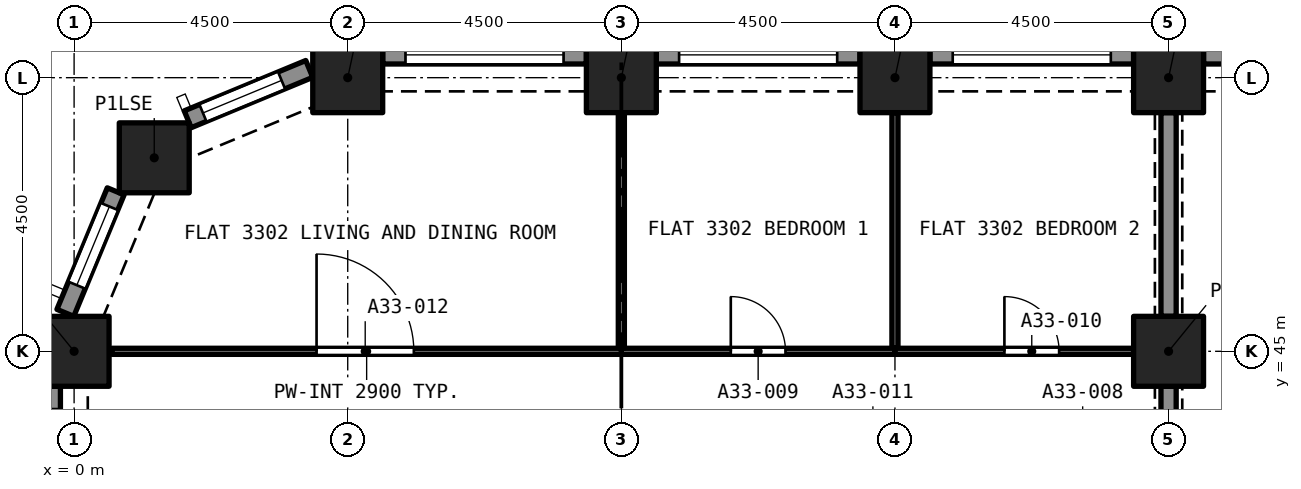
"""IFC4 building model, lengths in metres.
Left out: names, types, materials, properties, quantities, classifications, styles, units other than length and angle.
Written with IfcOpenShell. Run it as: python <this file> out.ifc"""

import sys

from ifc_helpers import new_model, si_unit, direction, frame, frame_2d, origin, origin_2d, place, context, subcontext, project, spatial, rectangle, extrude, element, fill, save


model = new_model("IFC4")
c1 = context("Model", 3, precision=1e-05, world=origin(), true_north=direction((0.0, 1.0)))
c2 = subcontext(c1, "Body", "Model", "MODEL_VIEW")
j1 = project(units=[si_unit("LENGTHUNIT", "METRE"), si_unit("PLANEANGLEUNIT", "RADIAN")], contexts=[c1])
p1 = place(None, origin())
s1 = spatial("IfcSite", under=j1, at=p1, CompositionType="ELEMENT")
p2 = place(p1, origin())
s2 = spatial("IfcBuilding", under=s1, at=p2, CompositionType="ELEMENT")
p3 = place(p2, frame((0.0, 0.0, 118.4)))
s3 = spatial("IfcBuildingStorey", under=s2, at=p3, CompositionType="ELEMENT", Elevation=118.4)
for number, where, z_axis, x_axis in (
    (1, (0.0, 45.0, 0.0), (0.0, 0.0, 1.0), (1.0, 0.0, 0.0)),
    (2, (18.0, 45.0, 0.0), (0.0, 0.0, 1.0), (1.0, 0.0, 0.0)),
    (3, (1.318, 48.182, 0.0), (0.0, 0.0, 1.0), (1.0, 0.0, 0.0)),
    (4, (4.5, 49.5, 0.0), (0.0, 0.0, 1.0), (1.0, 0.0, 0.0)),
    (5, (9.0, 49.5, 0.0), (0.0, 0.0, 1.0), (1.0, 0.0, 0.0)),
    (6, (13.5, 49.5, 0.0), (0.0, 0.0, 1.0), (1.0, 0.0, 0.0)),
    (7, (18.0, 49.5, 0.0), (0.0, 0.0, 1.0), (1.0, 0.0, 0.0)),
):
    element("IfcColumn", number, at=place(p3, frame(where, z_axis=z_axis, x_axis=x_axis)), inside=s3, PredefinedType="COLUMN", context=c2, shape_type="SweptSolid", body=[
        extrude(rectangle(XDim=1.15, YDim=1.15, at=origin_2d()), origin(), (0.0, 0.0, 1.0), 3.2),
    ])
p4 = place(p3, frame((18.575, 49.875, 0.0), z_axis=(0.0, 0.0, 1.0), x_axis=(1.0, 0.0, 0.0)))
e8 = element("IfcWall", 8, at=p4, inside=s3, PredefinedType="SOLIDWALL", context=c2, shape_type="SweptSolid", body=[
    extrude(rectangle(XDim=3.35, YDim=0.3, at=frame_2d((1.675, 0.0))), origin(), (0.0, 0.0, 1.0), 3.2),
])
p5 = place(p4, frame((0.375, 0.0, 0.45)))
e9 = element("IfcOpeningElement", 9, at=p5, cuts=e8, PredefinedType="OPENING", context=c2, shape_type="SweptSolid", body=[
    extrude(rectangle(XDim=2.6, YDim=1.95, at=frame_2d((1.3, 0.975))), frame((0.0, 0.16, 0.0), z_axis=(0.0, -1.0, 0.0), x_axis=(1.0, 0.0, 0.0)), (0.0, 0.0, 1.0), 0.32),
])
p6 = place(p3, frame((14.075, 49.875, 0.0), z_axis=(0.0, 0.0, 1.0), x_axis=(1.0, 0.0, 0.0)))
e10 = element("IfcWall", 10, at=p6, inside=s3, PredefinedType="SOLIDWALL", context=c2, shape_type="SweptSolid", body=[
    extrude(rectangle(XDim=3.35, YDim=0.3, at=frame_2d((1.675, 0.0))), origin(), (0.0, 0.0, 1.0), 3.2),
])
p7 = place(p6, frame((0.375, 0.0, 0.45)))
e11 = element("IfcOpeningElement", 11, at=p7, cuts=e10, PredefinedType="OPENING", context=c2, shape_type="SweptSolid", body=[
    extrude(rectangle(XDim=2.6, YDim=1.95, at=frame_2d((1.3, 0.975))), frame((0.0, 0.16, 0.0), z_axis=(0.0, -1.0, 0.0), x_axis=(1.0, 0.0, 0.0)), (0.0, 0.0, 1.0), 0.32),
])
p8 = place(p3, frame((9.575, 49.875, 0.0), z_axis=(0.0, 0.0, 1.0), x_axis=(1.0, 0.0, 0.0)))
e12 = element("IfcWall", 12, at=p8, inside=s3, PredefinedType="SOLIDWALL", context=c2, shape_type="SweptSolid", body=[
    extrude(rectangle(XDim=3.35, YDim=0.3, at=frame_2d((1.675, 0.0))), origin(), (0.0, 0.0, 1.0), 3.2),
])
p9 = place(p8, frame((0.375, 0.0, 0.45)))
e13 = element("IfcOpeningElement", 13, at=p9, cuts=e12, PredefinedType="OPENING", context=c2, shape_type="SweptSolid", body=[
    extrude(rectangle(XDim=2.6, YDim=1.95, at=frame_2d((1.3, 0.975))), frame((0.0, 0.16, 0.0), z_axis=(0.0, -1.0, 0.0), x_axis=(1.0, 0.0, 0.0)), (0.0, 0.0, 1.0), 0.32),
])
p10 = place(p3, frame((5.075, 49.875, 0.0), z_axis=(0.0, 0.0, 1.0), x_axis=(1.0, 0.0, 0.0)))
e14 = element("IfcWall", 14, at=p10, inside=s3, PredefinedType="SOLIDWALL", context=c2, shape_type="SweptSolid", body=[
    extrude(rectangle(XDim=3.35, YDim=0.3, at=frame_2d((1.675, 0.0))), origin(), (0.0, 0.0, 1.0), 3.2),
])
p11 = place(p10, frame((0.375, 0.0, 0.45)))
e15 = element("IfcOpeningElement", 15, at=p11, cuts=e14, PredefinedType="OPENING", context=c2, shape_type="SweptSolid", body=[
    extrude(rectangle(XDim=2.6, YDim=1.95, at=frame_2d((1.3, 0.975))), frame((0.0, 0.16, 0.0), z_axis=(0.0, -1.0, 0.0), x_axis=(1.0, 0.0, 0.0)), (0.0, 0.0, 1.0), 0.32),
])
p12 = place(p3, frame((1.869, 48.816, 0.0), z_axis=(0.0, 0.0, 1.0), x_axis=(0.923862802911, 0.382723818695, 0.0)))
e16 = element("IfcWall", 16, at=p12, inside=s3, PredefinedType="SOLIDWALL", context=c2, shape_type="SweptSolid", body=[
    extrude(rectangle(XDim=2.164, YDim=0.3, at=frame_2d((1.082, 0.0))), origin(), (0.0, 0.0, 1.0), 3.2),
])
p13 = place(p12, frame((0.271, 0.0, 0.45)))
e17 = element("IfcOpeningElement", 17, at=p13, cuts=e16, PredefinedType="OPENING", context=c2, shape_type="SweptSolid", body=[
    extrude(rectangle(XDim=1.4, YDim=1.95, at=frame_2d((0.7, 0.975))), frame((0.0, 0.16, 0.0), z_axis=(0.0, -1.0, 0.0), x_axis=(1.0, 0.0, 0.0)), (0.0, 0.0, 1.0), 0.32),
])
p14 = place(p3, frame((-0.144, 45.632, 0.0), z_axis=(0.0, 0.0, 1.0), x_axis=(0.382723818695, 0.923862802911, 0.0)))
e18 = element("IfcWall", 18, at=p14, inside=s3, PredefinedType="SOLIDWALL", context=c2, shape_type="SweptSolid", body=[
    extrude(rectangle(XDim=2.164, YDim=0.3, at=frame_2d((1.082, 0.0))), origin(), (0.0, 0.0, 1.0), 3.2),
])
p15 = place(p14, frame((0.493, 0.0, 0.45)))
e19 = element("IfcOpeningElement", 19, at=p15, cuts=e18, PredefinedType="OPENING", context=c2, shape_type="SweptSolid", body=[
    extrude(rectangle(XDim=1.4, YDim=1.95, at=frame_2d((0.7, 0.975))), frame((0.0, 0.16, 0.0), z_axis=(0.0, -1.0, 0.0), x_axis=(1.0, 0.0, 0.0)), (0.0, 0.0, 1.0), 0.32),
])
p16 = place(p3, frame((-0.375, 41.075, 0.0), z_axis=(0.0, 0.0, 1.0), x_axis=(0.0, 1.0, 0.0)))
e20 = element("IfcWall", 20, at=p16, inside=s3, PredefinedType="SOLIDWALL", context=c2, shape_type="SweptSolid", body=[
    extrude(rectangle(XDim=3.35, YDim=0.3, at=frame_2d((1.675, 0.0))), origin(), (0.0, 0.0, 1.0), 3.2),
])
p17 = place(p16, frame((0.375, 0.0, 0.45)))
e21 = element("IfcOpeningElement", 21, at=p17, cuts=e20, PredefinedType="OPENING", context=c2, shape_type="SweptSolid", body=[
    extrude(rectangle(XDim=2.6, YDim=1.95, at=frame_2d((1.3, 0.975))), frame((0.0, 0.16, 0.0), z_axis=(0.0, -1.0, 0.0), x_axis=(1.0, 0.0, 0.0)), (0.0, 0.0, 1.0), 0.32),
])
p18 = place(p3, frame((18.0, 41.075, 0.0), z_axis=(0.0, 0.0, 1.0), x_axis=(0.0, 1.0, 0.0)))
e22 = element("IfcWall", 22, at=p18, inside=s3, PredefinedType="PARTITIONING", context=c2, shape_type="SweptSolid", body=[
    extrude(rectangle(XDim=3.35, YDim=0.25, at=frame_2d((1.675, 0.0))), origin(), (0.0, 0.0, 1.0), 2.38),
])
p19 = place(p3, frame((13.5, 45.05, 0.0), z_axis=(0.0, 0.0, 1.0), x_axis=(0.0, 1.0, 0.0)))
e23 = element("IfcWall", 23, at=p19, inside=s3, PredefinedType="PARTITIONING", context=c2, shape_type="SweptSolid", body=[
    extrude(rectangle(XDim=3.875, YDim=0.1, at=frame_2d((1.938, 0.0))), origin(), (0.0, 0.0, 1.0), 2.9),
])
p20 = place(p3, frame((9.0, 45.0, 0.0), z_axis=(0.0, 0.0, 1.0), x_axis=(1.0, 0.0, 0.0)))
e24 = element("IfcWall", 24, at=p20, inside=s3, PredefinedType="PARTITIONING", context=c2, shape_type="SweptSolid", body=[
    extrude(rectangle(XDim=4.5, YDim=0.1, at=frame_2d((2.25, 0.0))), origin(), (0.0, 0.0, 1.0), 2.9),
])
p21 = place(p20, frame((1.8, 0.0, 0.0)))
e25 = element("IfcOpeningElement", 25, at=p21, cuts=e24, PredefinedType="OPENING", context=c2, shape_type="SweptSolid", body=[
    extrude(rectangle(XDim=0.9, YDim=2.1, at=frame_2d((0.45, 1.05))), frame((0.0, 0.06, 0.0), z_axis=(0.0, -1.0, 0.0), x_axis=(1.0, 0.0, 0.0)), (0.0, 0.0, 1.0), 0.12),
])
p22 = place(p3, frame((9.0, 45.05, 0.0), z_axis=(0.0, 0.0, 1.0), x_axis=(0.0, 1.0, 0.0)))
e26 = element("IfcWall", 26, at=p22, inside=s3, PredefinedType="PARTITIONING", context=c2, shape_type="SweptSolid", body=[
    extrude(rectangle(XDim=3.875, YDim=0.1, at=frame_2d((1.938, 0.0))), origin(), (0.0, 0.0, 1.0), 2.9),
])
p23 = place(p3, frame((13.5, 45.0, 0.0), z_axis=(0.0, 0.0, 1.0), x_axis=(1.0, 0.0, 0.0)))
e27 = element("IfcWall", 27, at=p23, inside=s3, PredefinedType="PARTITIONING", context=c2, shape_type="SweptSolid", body=[
    extrude(rectangle(XDim=3.925, YDim=0.1, at=frame_2d((1.962, 0.0))), origin(), (0.0, 0.0, 1.0), 2.9),
])
p24 = place(p23, frame((1.8, 0.0, 0.0)))
e28 = element("IfcOpeningElement", 28, at=p24, cuts=e27, PredefinedType="OPENING", context=c2, shape_type="SweptSolid", body=[
    extrude(rectangle(XDim=0.9, YDim=2.1, at=frame_2d((0.45, 1.05))), frame((0.0, 0.06, 0.0), z_axis=(0.0, -1.0, 0.0), x_axis=(1.0, 0.0, 0.0)), (0.0, 0.0, 1.0), 0.12),
])
p25 = place(p3, frame((18.0, 45.575, 0.0), z_axis=(0.0, 0.0, 1.0), x_axis=(0.0, 1.0, 0.0)))
e29 = element("IfcWall", 29, at=p25, inside=s3, PredefinedType="PARTITIONING", context=c2, shape_type="SweptSolid", body=[
    extrude(rectangle(XDim=3.35, YDim=0.25, at=frame_2d((1.675, 0.0))), origin(), (0.0, 0.0, 1.0), 2.38),
])
p26 = place(p3, frame((0.622, 45.0, 0.0), z_axis=(0.0, 0.0, 1.0), x_axis=(1.0, 0.0, 0.0)))
e30 = element("IfcWall", 30, at=p26, inside=s3, PredefinedType="PARTITIONING", context=c2, shape_type="SweptSolid", body=[
    extrude(rectangle(XDim=8.378, YDim=0.1, at=frame_2d((4.189, 0.0))), origin(), (0.0, 0.0, 1.0), 2.9),
])
p27 = place(p26, frame((3.365, 0.0, 0.0)))
e31 = element("IfcOpeningElement", 31, at=p27, cuts=e30, PredefinedType="OPENING", context=c2, shape_type="SweptSolid", body=[
    extrude(rectangle(XDim=1.6, YDim=2.1, at=frame_2d((0.8, 1.05))), frame((0.0, 0.06, 0.0), z_axis=(0.0, -1.0, 0.0), x_axis=(1.0, 0.0, 0.0)), (0.0, 0.0, 1.0), 0.12),
])
p28 = place(p7, origin())
e32 = element("IfcWindow", 32, at=p28, inside=s3, PartitioningType="SINGLE_PANEL", PredefinedType="WINDOW", context=c2, shape_type="SweptSolid", body=[
    extrude(rectangle(XDim=2.6, YDim=1.95, at=frame_2d((1.3, 0.975))), frame((0.0, 0.03, 0.0), z_axis=(0.0, -1.0, 0.0), x_axis=(1.0, 0.0, 0.0)), (0.0, 0.0, 1.0), 0.06),
])
fill(e11, e32)
p29 = place(p9, origin())
e33 = element("IfcWindow", 33, at=p29, inside=s3, PartitioningType="SINGLE_PANEL", PredefinedType="WINDOW", context=c2, shape_type="SweptSolid", body=[
    extrude(rectangle(XDim=2.6, YDim=1.95, at=frame_2d((1.3, 0.975))), frame((0.0, 0.03, 0.0), z_axis=(0.0, -1.0, 0.0), x_axis=(1.0, 0.0, 0.0)), (0.0, 0.0, 1.0), 0.06),
])
fill(e13, e33)
p30 = place(p11, origin())
e34 = element("IfcWindow", 34, at=p30, inside=s3, PartitioningType="SINGLE_PANEL", PredefinedType="WINDOW", context=c2, shape_type="SweptSolid", body=[
    extrude(rectangle(XDim=2.6, YDim=1.95, at=frame_2d((1.3, 0.975))), frame((0.0, 0.03, 0.0), z_axis=(0.0, -1.0, 0.0), x_axis=(1.0, 0.0, 0.0)), (0.0, 0.0, 1.0), 0.06),
])
fill(e15, e34)
p31 = place(p13, origin())
e35 = element("IfcWindow", 35, at=p31, inside=s3, PartitioningType="SINGLE_PANEL", PredefinedType="WINDOW", context=c2, shape_type="SweptSolid", body=[
    extrude(rectangle(XDim=1.4, YDim=1.95, at=frame_2d((0.7, 0.975))), frame((0.0, 0.03, 0.0), z_axis=(0.0, -1.0, 0.0), x_axis=(1.0, 0.0, 0.0)), (0.0, 0.0, 1.0), 0.06),
])
fill(e17, e35)
p32 = place(p15, origin())
e36 = element("IfcWindow", 36, at=p32, inside=s3, PartitioningType="SINGLE_PANEL", PredefinedType="WINDOW", context=c2, shape_type="SweptSolid", body=[
    extrude(rectangle(XDim=1.4, YDim=1.95, at=frame_2d((0.7, 0.975))), frame((0.0, 0.03, 0.0), z_axis=(0.0, -1.0, 0.0), x_axis=(1.0, 0.0, 0.0)), (0.0, 0.0, 1.0), 0.06),
])
fill(e19, e36)
p33 = place(p21, origin())
e37 = element("IfcDoor", 37, at=p33, inside=s3, OperationType="SINGLE_SWING_LEFT", PredefinedType="DOOR", context=c2, shape_type="SweptSolid", body=[
    extrude(rectangle(XDim=0.9, YDim=2.1, at=frame_2d((0.45, 1.05))), frame((0.0, 0.025, 0.0), z_axis=(0.0, -1.0, 0.0), x_axis=(1.0, 0.0, 0.0)), (0.0, 0.0, 1.0), 0.05),
])
fill(e25, e37)
p34 = place(p24, origin())
e38 = element("IfcDoor", 38, at=p34, inside=s3, OperationType="SINGLE_SWING_RIGHT", PredefinedType="DOOR", context=c2, shape_type="SweptSolid", body=[
    extrude(rectangle(XDim=0.9, YDim=2.1, at=frame_2d((0.45, 1.05))), frame((0.0, 0.025, 0.0), z_axis=(0.0, -1.0, 0.0), x_axis=(1.0, 0.0, 0.0)), (0.0, 0.0, 1.0), 0.05),
])
fill(e28, e38)
p35 = place(p27, origin())
e39 = element("IfcDoor", 39, at=p35, inside=s3, OperationType="SINGLE_SWING_LEFT", PredefinedType="DOOR", context=c2, shape_type="SweptSolid", body=[
    extrude(rectangle(XDim=1.6, YDim=2.1, at=frame_2d((0.8, 1.05))), frame((0.0, 0.025, 0.0), z_axis=(0.0, -1.0, 0.0), x_axis=(1.0, 0.0, 0.0)), (0.0, 0.0, 1.0), 0.05),
])
fill(e31, e39)
save(model, sys.argv[1])
